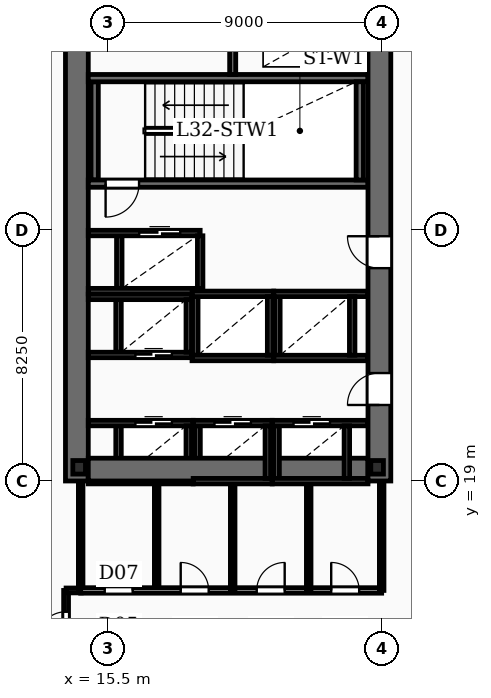
"""IFC4 building model, lengths in metres.
Left out: names, types, materials, properties, quantities, classifications, styles, units other than length and angle.
Written with IfcOpenShell. Run it as: python <this file> out.ifc"""

import sys

from ifc_helpers import new_model, si_unit, direction, frame, frame_2d, origin, origin_2d, place, context, subcontext, project, spatial, rectangle, i_section, extrude, element, fill, save


model = new_model("IFC4")
c1 = context("Model", 3, precision=1e-05, world=origin(), true_north=direction((0.0, 1.0)))
c2 = subcontext(c1, "Body", "Model", "MODEL_VIEW")
j1 = project(units=[si_unit("LENGTHUNIT", "METRE"), si_unit("PLANEANGLEUNIT", "RADIAN")], contexts=[c1])
p1 = place(None, origin())
s1 = spatial("IfcSite", under=j1, at=p1, CompositionType="ELEMENT")
p2 = place(p1, origin())
s2 = spatial("IfcBuilding", under=s1, at=p2, CompositionType="ELEMENT")
p3 = place(p2, frame((0.0, 0.0, 138.25)))
s3 = spatial("IfcBuildingStorey", under=s2, at=p3, CompositionType="ELEMENT", Elevation=138.25)
p4 = place(p3, frame((14.475, 19.0, -0.27), z_axis=(0.0, 0.0, 1.0), x_axis=(0.0, 1.0, 0.0)))
e1 = element("IfcWall", 1, at=p4, inside=s3, PredefinedType="SHEAR", context=c2, shape_type="SweptSolid", body=[
    extrude(rectangle(XDim=15.3, YDim=0.75, at=frame_2d((7.65, 0.0))), origin(), (0.0, 0.0, 1.0), 3.75),
])
p5 = place(p3, frame((24.425, 19.0, -0.27), z_axis=(0.0, 0.0, 1.0), x_axis=(0.0, 1.0, 0.0)))
e2 = element("IfcWall", 2, at=p5, inside=s3, PredefinedType="SHEAR", context=c2, shape_type="SweptSolid", body=[
    extrude(rectangle(XDim=15.3, YDim=0.75, at=frame_2d((7.65, 0.0))), origin(), (0.0, 0.0, 1.0), 3.75),
])
p6 = place(p5, frame((2.5, 0.0, 0.27)))
e3 = element("IfcOpeningElement", 3, at=p6, cuts=e2, PredefinedType="OPENING", context=c2, shape_type="SweptSolid", body=[
    extrude(rectangle(XDim=1.05, YDim=2.15, at=frame_2d((0.525, 1.075))), frame((0.0, 0.385, 0.0), z_axis=(0.0, -1.0, 0.0), x_axis=(1.0, 0.0, 0.0)), (0.0, 0.0, 1.0), 0.77),
])
p7 = place(p5, frame((7.0, 0.0, 0.27)))
e4 = element("IfcOpeningElement", 4, at=p7, cuts=e2, PredefinedType="OPENING", context=c2, shape_type="SweptSolid", body=[
    extrude(rectangle(XDim=1.05, YDim=2.15, at=frame_2d((0.525, 1.075))), frame((0.0, 0.385, 0.0), z_axis=(0.0, -1.0, 0.0), x_axis=(1.0, 0.0, 0.0)), (0.0, 0.0, 1.0), 0.77),
])
p8 = place(p3, frame((14.85, 19.375, -0.27), z_axis=(0.0, 0.0, 1.0), x_axis=(1.0, 0.0, 0.0)))
e5 = element("IfcWall", 5, at=p8, inside=s3, PredefinedType="SHEAR", context=c2, shape_type="SweptSolid", body=[
    extrude(rectangle(XDim=9.2, YDim=0.75, at=frame_2d((4.6, 0.0))), origin(), (0.0, 0.0, 1.0), 3.75),
])
for number, where, z_axis, x_axis in (
    (6, (14.55, 19.45, -0.27), (0.0, 0.0, 1.0), (1.0, 0.0, 0.0)),
    (7, (24.35, 19.45, -0.27), (0.0, 0.0, 1.0), (1.0, 0.0, 0.0)),
):
    element("IfcColumn", number, at=place(p3, frame(where, z_axis=z_axis, x_axis=x_axis)), inside=s3, PredefinedType="COLUMN", context=c2, shape_type="SweptSolid", body=[
        extrude(i_section(OverallWidth=0.416, OverallDepth=0.446, WebThickness=0.039, FlangeThickness=0.063, FilletRadius=0.02, at=origin_2d()), origin(), (0.0, 0.0, 1.0), 3.75),
    ])
p9 = place(p3, frame((24.05, 28.78, 0.0), z_axis=(0.0, 0.0, 1.0), x_axis=(-1.0, 0.0, 0.0)))
e8 = element("IfcWall", 8, at=p9, inside=s3, PredefinedType="SOLIDWALL", context=c2, shape_type="SweptSolid", body=[
    extrude(rectangle(XDim=9.2, YDim=0.24, at=frame_2d((4.6, 0.0))), origin(), (0.0, 0.0, 1.0), 3.48),
])
p10 = place(p9, frame((7.53, 0.0, 0.0)))
e9 = element("IfcOpeningElement", 9, at=p10, cuts=e8, PredefinedType="OPENING", context=c2, shape_type="SweptSolid", body=[
    extrude(rectangle(XDim=1.1, YDim=2.15, at=frame_2d((0.55, 1.075))), frame((0.0, 0.13, 0.0), z_axis=(0.0, -1.0, 0.0), x_axis=(1.0, 0.0, 0.0)), (0.0, 0.0, 1.0), 0.26),
])
p11 = place(p3, frame((14.85, 32.25, 0.0), z_axis=(0.0, 0.0, 1.0), x_axis=(1.0, 0.0, 0.0)))
e10 = element("IfcWall", 10, at=p11, inside=s3, PredefinedType="SOLIDWALL", context=c2, shape_type="SweptSolid", body=[
    extrude(rectangle(XDim=9.2, YDim=0.24, at=frame_2d((4.6, 0.0))), origin(), (0.0, 0.0, 1.0), 3.48),
])
for number, where, z_axis, x_axis in (
    (11, (15.06, 28.9, 0.0), (0.0, 0.0, 1.0), (0.0, 1.0, 0.0)),
    (12, (23.78, 28.9, 0.0), (0.0, 0.0, 1.0), (0.0, 1.0, 0.0)),
):
    element("IfcWall", number, at=place(p3, frame(where, z_axis=z_axis, x_axis=x_axis)), inside=s3, PredefinedType="SOLIDWALL", context=c2, shape_type="SweptSolid", body=[
        extrude(rectangle(XDim=3.23, YDim=0.24, at=frame_2d((1.615, 0.0))), origin(), (0.0, 0.0, 1.0), 3.48),
    ])
p12 = place(p3, frame((19.6, 32.37, 0.0), z_axis=(0.0, 0.0, 1.0), x_axis=(0.0, 1.0, 0.0)))
e13 = element("IfcWall", 13, at=p12, inside=s3, PredefinedType="SOLIDWALL", context=c2, shape_type="SweptSolid", body=[
    extrude(rectangle(XDim=1.13, YDim=0.2, at=frame_2d((0.565, 0.0))), origin(), (0.0, 0.0, 1.0), 3.48),
])
p13 = place(p3, frame((14.85, 20.905, 0.0), z_axis=(0.0, 0.0, 1.0), x_axis=(1.0, 0.0, 0.0)))
e14 = element("IfcWall", 14, at=p13, inside=s3, PredefinedType="SOLIDWALL", context=c2, shape_type="SweptSolid", body=[
    extrude(rectangle(XDim=3.45, YDim=0.18, at=frame_2d((1.725, 0.0))), origin(), (0.0, 0.0, 1.0), 3.48),
])
p14 = place(p13, frame((1.55, 0.0, 0.0)))
e15 = element("IfcOpeningElement", 15, at=p14, cuts=e14, PredefinedType="OPENING", context=c2, shape_type="SweptSolid", body=[
    extrude(rectangle(XDim=1.2, YDim=2.2, at=frame_2d((0.6, 1.1))), frame((0.0, 0.1, 0.0), z_axis=(0.0, -1.0, 0.0), x_axis=(1.0, 0.0, 0.0)), (0.0, 0.0, 1.0), 0.2),
])
p15 = place(p3, frame((14.85, 18.995, 0.0), z_axis=(0.0, 0.0, 1.0), x_axis=(1.0, 0.0, 0.0)))
e16 = element("IfcWall", 16, at=p15, inside=s3, PredefinedType="SOLIDWALL", context=c2, shape_type="SweptSolid", body=[
    extrude(rectangle(XDim=3.45, YDim=0.18, at=frame_2d((1.725, 0.0))), origin(), (0.0, 0.0, 1.0), 3.48),
])
for number, where, z_axis, x_axis in (
    (17, (15.845, 19.085, 0.0), (0.0, 0.0, 1.0), (0.0, 1.0, 0.0)),
    (18, (18.155, 19.085, 0.0), (0.0, 0.0, 1.0), (0.0, 1.0, 0.0)),
):
    element("IfcWall", number, at=place(p3, frame(where, z_axis=z_axis, x_axis=x_axis)), inside=s3, PredefinedType="SOLIDWALL", context=c2, shape_type="SweptSolid", body=[
        extrude(rectangle(XDim=1.73, YDim=0.18, at=frame_2d((0.865, 0.0))), origin(), (0.0, 0.0, 1.0), 3.48),
    ])
p16 = place(p3, frame((18.3, 20.905, 0.0), z_axis=(0.0, 0.0, 1.0), x_axis=(1.0, 0.0, 0.0)))
e19 = element("IfcWall", 19, at=p16, inside=s3, PredefinedType="SOLIDWALL", context=c2, shape_type="SweptSolid", body=[
    extrude(rectangle(XDim=2.6, YDim=0.18, at=frame_2d((1.3, 0.0))), origin(), (0.0, 0.0, 1.0), 3.48),
])
p17 = place(p16, frame((0.7, 0.0, 0.0)))
e20 = element("IfcOpeningElement", 20, at=p17, cuts=e19, PredefinedType="OPENING", context=c2, shape_type="SweptSolid", body=[
    extrude(rectangle(XDim=1.2, YDim=2.2, at=frame_2d((0.6, 1.1))), frame((0.0, 0.1, 0.0), z_axis=(0.0, -1.0, 0.0), x_axis=(1.0, 0.0, 0.0)), (0.0, 0.0, 1.0), 0.2),
])
p18 = place(p3, frame((18.3, 18.995, 0.0), z_axis=(0.0, 0.0, 1.0), x_axis=(1.0, 0.0, 0.0)))
e21 = element("IfcWall", 21, at=p18, inside=s3, PredefinedType="SOLIDWALL", context=c2, shape_type="SweptSolid", body=[
    extrude(rectangle(XDim=2.6, YDim=0.18, at=frame_2d((1.3, 0.0))), origin(), (0.0, 0.0, 1.0), 3.48),
])
for number, where, z_axis, x_axis in (
    (22, (18.445, 19.085, 0.0), (0.0, 0.0, 1.0), (0.0, 1.0, 0.0)),
    (23, (20.755, 19.085, 0.0), (0.0, 0.0, 1.0), (0.0, 1.0, 0.0)),
):
    element("IfcWall", number, at=place(p3, frame(where, z_axis=z_axis, x_axis=x_axis)), inside=s3, PredefinedType="SOLIDWALL", context=c2, shape_type="SweptSolid", body=[
        extrude(rectangle(XDim=1.73, YDim=0.18, at=frame_2d((0.865, 0.0))), origin(), (0.0, 0.0, 1.0), 3.48),
    ])
p19 = place(p3, frame((20.9, 20.905, 0.0), z_axis=(0.0, 0.0, 1.0), x_axis=(1.0, 0.0, 0.0)))
e24 = element("IfcWall", 24, at=p19, inside=s3, PredefinedType="SOLIDWALL", context=c2, shape_type="SweptSolid", body=[
    extrude(rectangle(XDim=3.15, YDim=0.18, at=frame_2d((1.575, 0.0))), origin(), (0.0, 0.0, 1.0), 3.48),
])
p20 = place(p19, frame((0.7, 0.0, 0.0)))
e25 = element("IfcOpeningElement", 25, at=p20, cuts=e24, PredefinedType="OPENING", context=c2, shape_type="SweptSolid", body=[
    extrude(rectangle(XDim=1.2, YDim=2.2, at=frame_2d((0.6, 1.1))), frame((0.0, 0.1, 0.0), z_axis=(0.0, -1.0, 0.0), x_axis=(1.0, 0.0, 0.0)), (0.0, 0.0, 1.0), 0.2),
])
p21 = place(p3, frame((20.9, 18.995, 0.0), z_axis=(0.0, 0.0, 1.0), x_axis=(1.0, 0.0, 0.0)))
e26 = element("IfcWall", 26, at=p21, inside=s3, PredefinedType="SOLIDWALL", context=c2, shape_type="SweptSolid", body=[
    extrude(rectangle(XDim=3.15, YDim=0.18, at=frame_2d((1.575, 0.0))), origin(), (0.0, 0.0, 1.0), 3.48),
])
for number, where, z_axis, x_axis in (
    (27, (21.045, 19.085, 0.0), (0.0, 0.0, 1.0), (0.0, 1.0, 0.0)),
    (28, (23.355, 19.085, 0.0), (0.0, 0.0, 1.0), (0.0, 1.0, 0.0)),
):
    element("IfcWall", number, at=place(p3, frame(where, z_axis=z_axis, x_axis=x_axis)), inside=s3, PredefinedType="SOLIDWALL", context=c2, shape_type="SweptSolid", body=[
        extrude(rectangle(XDim=1.73, YDim=0.18, at=frame_2d((0.865, 0.0))), origin(), (0.0, 0.0, 1.0), 3.48),
    ])
p22 = place(p3, frame((14.85, 25.055, 0.0), z_axis=(0.0, 0.0, 1.0), x_axis=(1.0, 0.0, 0.0)))
e29 = element("IfcWall", 29, at=p22, inside=s3, PredefinedType="SOLIDWALL", context=c2, shape_type="SweptSolid", body=[
    extrude(rectangle(XDim=3.412, YDim=0.18, at=frame_2d((1.706, 0.0))), origin(), (0.0, 0.0, 1.0), 3.48),
])
p23 = place(p3, frame((14.85, 23.145, 0.0), z_axis=(0.0, 0.0, 1.0), x_axis=(1.0, 0.0, 0.0)))
e30 = element("IfcWall", 30, at=p23, inside=s3, PredefinedType="SOLIDWALL", context=c2, shape_type="SweptSolid", body=[
    extrude(rectangle(XDim=3.412, YDim=0.18, at=frame_2d((1.706, 0.0))), origin(), (0.0, 0.0, 1.0), 3.48),
])
p24 = place(p23, frame((1.55, 0.0, 0.0)))
e31 = element("IfcOpeningElement", 31, at=p24, cuts=e30, PredefinedType="OPENING", context=c2, shape_type="SweptSolid", body=[
    extrude(rectangle(XDim=1.2, YDim=2.2, at=frame_2d((0.6, 1.1))), frame((0.0, 0.1, 0.0), z_axis=(0.0, -1.0, 0.0), x_axis=(1.0, 0.0, 0.0)), (0.0, 0.0, 1.0), 0.2),
])
for number, where, z_axis, x_axis in (
    (32, (15.845, 23.235, 0.0), (0.0, 0.0, 1.0), (0.0, 1.0, 0.0)),
    (33, (18.155, 23.235, 0.0), (0.0, 0.0, 1.0), (0.0, 1.0, 0.0)),
):
    element("IfcWall", number, at=place(p3, frame(where, z_axis=z_axis, x_axis=x_axis)), inside=s3, PredefinedType="SOLIDWALL", context=c2, shape_type="SweptSolid", body=[
        extrude(rectangle(XDim=1.73, YDim=0.18, at=frame_2d((0.865, 0.0))), origin(), (0.0, 0.0, 1.0), 3.48),
    ])
for number, where, z_axis, x_axis in (
    (34, (18.262, 25.155, 0.0), (0.0, 0.0, 1.0), (1.0, 0.0, 0.0)),
    (35, (18.262, 23.045, 0.0), (0.0, 0.0, 1.0), (1.0, 0.0, 0.0)),
):
    element("IfcWall", number, at=place(p3, frame(where, z_axis=z_axis, x_axis=x_axis)), inside=s3, PredefinedType="SOLIDWALL", context=c2, shape_type="SweptSolid", body=[
        extrude(rectangle(XDim=2.688, YDim=0.18, at=frame_2d((1.344, 0.0))), origin(), (0.0, 0.0, 1.0), 3.48),
    ])
for number, where, z_axis, x_axis in (
    (36, (18.37, 23.135, 0.0), (0.0, 0.0, 1.0), (0.0, 1.0, 0.0)),
    (37, (20.83, 23.135, 0.0), (0.0, 0.0, 1.0), (0.0, 1.0, 0.0)),
):
    element("IfcWall", number, at=place(p3, frame(where, z_axis=z_axis, x_axis=x_axis)), inside=s3, PredefinedType="SOLIDWALL", context=c2, shape_type="SweptSolid", body=[
        extrude(rectangle(XDim=1.93, YDim=0.18, at=frame_2d((0.965, 0.0))), origin(), (0.0, 0.0, 1.0), 3.48),
    ])
for number, where, z_axis, x_axis in (
    (38, (20.95, 25.155, 0.0), (0.0, 0.0, 1.0), (1.0, 0.0, 0.0)),
    (39, (20.95, 23.045, 0.0), (0.0, 0.0, 1.0), (1.0, 0.0, 0.0)),
):
    element("IfcWall", number, at=place(p3, frame(where, z_axis=z_axis, x_axis=x_axis)), inside=s3, PredefinedType="SOLIDWALL", context=c2, shape_type="SweptSolid", body=[
        extrude(rectangle(XDim=3.1, YDim=0.18, at=frame_2d((1.55, 0.0))), origin(), (0.0, 0.0, 1.0), 3.48),
    ])
for number, where, z_axis, x_axis in (
    (40, (21.07, 23.135, 0.0), (0.0, 0.0, 1.0), (0.0, 1.0, 0.0)),
    (41, (23.53, 23.135, 0.0), (0.0, 0.0, 1.0), (0.0, 1.0, 0.0)),
):
    element("IfcWall", number, at=place(p3, frame(where, z_axis=z_axis, x_axis=x_axis)), inside=s3, PredefinedType="SOLIDWALL", context=c2, shape_type="SweptSolid", body=[
        extrude(rectangle(XDim=1.93, YDim=0.18, at=frame_2d((0.965, 0.0))), origin(), (0.0, 0.0, 1.0), 3.48),
    ])
p25 = place(p3, frame((14.85, 27.155, 0.0), z_axis=(0.0, 0.0, 1.0), x_axis=(1.0, 0.0, 0.0)))
e42 = element("IfcWall", 42, at=p25, inside=s3, PredefinedType="SOLIDWALL", context=c2, shape_type="SweptSolid", body=[
    extrude(rectangle(XDim=3.68, YDim=0.18, at=frame_2d((1.84, 0.0))), origin(), (0.0, 0.0, 1.0), 3.48),
])
p26 = place(p25, frame((1.675, 0.0, 0.0)))
e43 = element("IfcOpeningElement", 43, at=p26, cuts=e42, PredefinedType="OPENING", context=c2, shape_type="SweptSolid", body=[
    extrude(rectangle(XDim=1.35, YDim=2.3, at=frame_2d((0.675, 1.15))), frame((0.0, 0.1, 0.0), z_axis=(0.0, -1.0, 0.0), x_axis=(1.0, 0.0, 0.0)), (0.0, 0.0, 1.0), 0.2),
])
p27 = place(p3, frame((14.85, 25.245, 0.0), z_axis=(0.0, 0.0, 1.0), x_axis=(1.0, 0.0, 0.0)))
e44 = element("IfcWall", 44, at=p27, inside=s3, PredefinedType="SOLIDWALL", context=c2, shape_type="SweptSolid", body=[
    extrude(rectangle(XDim=3.68, YDim=0.18, at=frame_2d((1.84, 0.0))), origin(), (0.0, 0.0, 1.0), 3.48),
])
for number, where, z_axis, x_axis in (
    (45, (15.87, 25.335, 0.0), (0.0, 0.0, 1.0), (0.0, 1.0, 0.0)),
    (46, (18.53, 25.335, 0.0), (0.0, 0.0, 1.0), (0.0, 1.0, 0.0)),
):
    element("IfcWall", number, at=place(p3, frame(where, z_axis=z_axis, x_axis=x_axis)), inside=s3, PredefinedType="SOLIDWALL", context=c2, shape_type="SweptSolid", body=[
        extrude(rectangle(XDim=1.73, YDim=0.18, at=frame_2d((0.865, 0.0))), origin(), (0.0, 0.0, 1.0), 3.48),
    ])
for number, where, z_axis, x_axis in (
    (47, (17.1, 15.4, 0.0), (0.0, 0.0, 1.0), (0.0, 1.0, 0.0)),
    (48, (19.6, 15.4, 0.0), (0.0, 0.0, 1.0), (0.0, 1.0, 0.0)),
    (49, (22.1, 15.4, 0.0), (0.0, 0.0, 1.0), (0.0, 1.0, 0.0)),
):
    element("IfcWall", number, at=place(p3, frame(where, z_axis=z_axis, x_axis=x_axis)), inside=s3, PredefinedType="PARTITIONING", context=c2, shape_type="SweptSolid", body=[
        extrude(rectangle(XDim=3.58, YDim=0.15, at=frame_2d((1.79, 0.0))), origin(), (0.0, 0.0, 1.0), 2.54),
    ])
p28 = place(p3, frame((14.6, 15.4, 0.0), z_axis=(0.0, 0.0, 1.0), x_axis=(1.0, 0.0, 0.0)))
e50 = element("IfcWall", 50, at=p28, inside=s3, PredefinedType="PARTITIONING", context=c2, shape_type="SweptSolid", body=[
    extrude(rectangle(XDim=9.9, YDim=0.18, at=frame_2d((4.95, 0.0))), origin(), (0.0, 0.0, 1.0), 2.54),
])
p29 = place(p28, frame((0.79, 0.0, 0.0)))
e51 = element("IfcOpeningElement", 51, at=p29, cuts=e50, PredefinedType="OPENING", context=c2, shape_type="SweptSolid", body=[
    extrude(rectangle(XDim=0.92, YDim=2.1, at=frame_2d((0.46, 1.05))), frame((0.0, 0.1, 0.0), z_axis=(0.0, -1.0, 0.0), x_axis=(1.0, 0.0, 0.0)), (0.0, 0.0, 1.0), 0.2),
])
p30 = place(p28, frame((3.29, 0.0, 0.0)))
e52 = element("IfcOpeningElement", 52, at=p30, cuts=e50, PredefinedType="OPENING", context=c2, shape_type="SweptSolid", body=[
    extrude(rectangle(XDim=0.92, YDim=2.1, at=frame_2d((0.46, 1.05))), frame((0.0, 0.1, 0.0), z_axis=(0.0, -1.0, 0.0), x_axis=(1.0, 0.0, 0.0)), (0.0, 0.0, 1.0), 0.2),
])
p31 = place(p28, frame((5.79, 0.0, 0.0)))
e53 = element("IfcOpeningElement", 53, at=p31, cuts=e50, PredefinedType="OPENING", context=c2, shape_type="SweptSolid", body=[
    extrude(rectangle(XDim=0.92, YDim=2.1, at=frame_2d((0.46, 1.05))), frame((0.0, 0.1, 0.0), z_axis=(0.0, -1.0, 0.0), x_axis=(1.0, 0.0, 0.0)), (0.0, 0.0, 1.0), 0.2),
])
p32 = place(p28, frame((8.24, 0.0, 0.0)))
e54 = element("IfcOpeningElement", 54, at=p32, cuts=e50, PredefinedType="OPENING", context=c2, shape_type="SweptSolid", body=[
    extrude(rectangle(XDim=0.92, YDim=2.1, at=frame_2d((0.46, 1.05))), frame((0.0, 0.1, 0.0), z_axis=(0.0, -1.0, 0.0), x_axis=(1.0, 0.0, 0.0)), (0.0, 0.0, 1.0), 0.2),
])
for number, where, z_axis, x_axis in (
    (55, (14.6, 15.4, 0.0), (0.0, 0.0, 1.0), (0.0, 1.0, 0.0)),
    (56, (24.5, 15.4, 0.0), (0.0, 0.0, 1.0), (0.0, 1.0, 0.0)),
):
    element("IfcWall", number, at=place(p3, frame(where, z_axis=z_axis, x_axis=x_axis)), inside=s3, PredefinedType="PARTITIONING", context=c2, shape_type="SweptSolid", body=[
        extrude(rectangle(XDim=3.58, YDim=0.15, at=frame_2d((1.79, 0.0))), origin(), (0.0, 0.0, 1.0), 2.54),
    ])
p33 = place(p3, frame((14.12, 13.1, 0.0), z_axis=(0.0, 0.0, 1.0), x_axis=(0.0, 1.0, 0.0)))
e57 = element("IfcWall", 57, at=p33, inside=s3, PredefinedType="PARTITIONING", context=c2, shape_type="SweptSolid", body=[
    extrude(rectangle(XDim=2.3, YDim=0.16, at=frame_2d((1.15, 0.0))), origin(), (0.0, 0.0, 1.0), 2.54),
])
p34 = place(p33, frame((0.65, 0.0, 0.0)))
e58 = element("IfcOpeningElement", 58, at=p34, cuts=e57, PredefinedType="OPENING", context=c2, shape_type="SweptSolid", body=[
    extrude(rectangle(XDim=0.95, YDim=2.15, at=frame_2d((0.475, 1.075))), frame((0.0, 0.09, 0.0), z_axis=(0.0, -1.0, 0.0), x_axis=(1.0, 0.0, 0.0)), (0.0, 0.0, 1.0), 0.18),
])
p35 = place(p3, frame((14.12, 15.4, 0.0), z_axis=(0.0, 0.0, 1.0), x_axis=(1.0, 0.0, 0.0)))
e59 = element("IfcWall", 59, at=p35, inside=s3, PredefinedType="PARTITIONING", context=c2, shape_type="SweptSolid", body=[
    extrude(rectangle(XDim=0.5, YDim=0.16, at=frame_2d((0.25, 0.0))), origin(), (0.0, 0.0, 1.0), 2.54),
])
p36 = place(p6, origin())
e60 = element("IfcDoor", 60, at=p36, inside=s3, OperationType="SINGLE_SWING_LEFT", PredefinedType="DOOR", context=c2, shape_type="SweptSolid", body=[
    extrude(rectangle(XDim=1.05, YDim=2.15, at=frame_2d((0.525, 1.075))), frame((0.0, 0.025, 0.0), z_axis=(0.0, -1.0, 0.0), x_axis=(1.0, 0.0, 0.0)), (0.0, 0.0, 1.0), 0.05),
])
fill(e3, e60)
p37 = place(p7, origin())
e61 = element("IfcDoor", 61, at=p37, inside=s3, OperationType="SINGLE_SWING_RIGHT", PredefinedType="DOOR", context=c2, shape_type="SweptSolid", body=[
    extrude(rectangle(XDim=1.05, YDim=2.15, at=frame_2d((0.525, 1.075))), frame((0.0, 0.025, 0.0), z_axis=(0.0, -1.0, 0.0), x_axis=(1.0, 0.0, 0.0)), (0.0, 0.0, 1.0), 0.05),
])
fill(e4, e61)
p38 = place(p10, origin())
e62 = element("IfcDoor", 62, at=p38, inside=s3, OperationType="SINGLE_SWING_RIGHT", PredefinedType="DOOR", context=c2, shape_type="SweptSolid", body=[
    extrude(rectangle(XDim=1.1, YDim=2.15, at=frame_2d((0.55, 1.075))), frame((0.0, 0.025, 0.0), z_axis=(0.0, -1.0, 0.0), x_axis=(1.0, 0.0, 0.0)), (0.0, 0.0, 1.0), 0.05),
])
fill(e9, e62)
p39 = place(p14, origin())
e63 = element("IfcDoor", 63, at=p39, inside=s3, OperationType="DOUBLE_DOOR_SLIDING", PredefinedType="DOOR", context=c2, shape_type="SweptSolid", body=[
    extrude(rectangle(XDim=1.2, YDim=2.2, at=frame_2d((0.6, 1.1))), frame((0.0, 0.025, 0.0), z_axis=(0.0, -1.0, 0.0), x_axis=(1.0, 0.0, 0.0)), (0.0, 0.0, 1.0), 0.05),
])
fill(e15, e63)
p40 = place(p17, origin())
e64 = element("IfcDoor", 64, at=p40, inside=s3, OperationType="DOUBLE_DOOR_SLIDING", PredefinedType="DOOR", context=c2, shape_type="SweptSolid", body=[
    extrude(rectangle(XDim=1.2, YDim=2.2, at=frame_2d((0.6, 1.1))), frame((0.0, 0.025, 0.0), z_axis=(0.0, -1.0, 0.0), x_axis=(1.0, 0.0, 0.0)), (0.0, 0.0, 1.0), 0.05),
])
fill(e20, e64)
p41 = place(p20, origin())
e65 = element("IfcDoor", 65, at=p41, inside=s3, OperationType="DOUBLE_DOOR_SLIDING", PredefinedType="DOOR", context=c2, shape_type="SweptSolid", body=[
    extrude(rectangle(XDim=1.2, YDim=2.2, at=frame_2d((0.6, 1.1))), frame((0.0, 0.025, 0.0), z_axis=(0.0, -1.0, 0.0), x_axis=(1.0, 0.0, 0.0)), (0.0, 0.0, 1.0), 0.05),
])
fill(e25, e65)
p42 = place(p24, origin())
e66 = element("IfcDoor", 66, at=p42, inside=s3, OperationType="DOUBLE_DOOR_SLIDING", PredefinedType="DOOR", context=c2, shape_type="SweptSolid", body=[
    extrude(rectangle(XDim=1.2, YDim=2.2, at=frame_2d((0.6, 1.1))), frame((0.0, 0.025, 0.0), z_axis=(0.0, -1.0, 0.0), x_axis=(1.0, 0.0, 0.0)), (0.0, 0.0, 1.0), 0.05),
])
fill(e31, e66)
p43 = place(p26, origin())
e67 = element("IfcDoor", 67, at=p43, inside=s3, OperationType="DOUBLE_DOOR_SLIDING", PredefinedType="DOOR", context=c2, shape_type="SweptSolid", body=[
    extrude(rectangle(XDim=1.35, YDim=2.3, at=frame_2d((0.675, 1.15))), frame((0.0, 0.025, 0.0), z_axis=(0.0, -1.0, 0.0), x_axis=(1.0, 0.0, 0.0)), (0.0, 0.0, 1.0), 0.05),
])
fill(e43, e67)
p44 = place(p29, origin())
e68 = element("IfcDoor", 68, at=p44, inside=s3, OperationType="SINGLE_SWING_RIGHT", PredefinedType="DOOR", context=c2, shape_type="SweptSolid", body=[
    extrude(rectangle(XDim=0.92, YDim=2.1, at=frame_2d((0.46, 1.05))), frame((0.0, 0.025, 0.0), z_axis=(0.0, -1.0, 0.0), x_axis=(1.0, 0.0, 0.0)), (0.0, 0.0, 1.0), 0.05),
])
fill(e51, e68)
p45 = place(p30, origin())
e69 = element("IfcDoor", 69, at=p45, inside=s3, OperationType="SINGLE_SWING_LEFT", PredefinedType="DOOR", context=c2, shape_type="SweptSolid", body=[
    extrude(rectangle(XDim=0.92, YDim=2.1, at=frame_2d((0.46, 1.05))), frame((0.0, 0.025, 0.0), z_axis=(0.0, -1.0, 0.0), x_axis=(1.0, 0.0, 0.0)), (0.0, 0.0, 1.0), 0.05),
])
fill(e52, e69)
p46 = place(p31, origin())
e70 = element("IfcDoor", 70, at=p46, inside=s3, OperationType="SINGLE_SWING_RIGHT", PredefinedType="DOOR", context=c2, shape_type="SweptSolid", body=[
    extrude(rectangle(XDim=0.92, YDim=2.1, at=frame_2d((0.46, 1.05))), frame((0.0, 0.025, 0.0), z_axis=(0.0, -1.0, 0.0), x_axis=(1.0, 0.0, 0.0)), (0.0, 0.0, 1.0), 0.05),
])
fill(e53, e70)
p47 = place(p32, origin())
e71 = element("IfcDoor", 71, at=p47, inside=s3, OperationType="SINGLE_SWING_LEFT", PredefinedType="DOOR", context=c2, shape_type="SweptSolid", body=[
    extrude(rectangle(XDim=0.92, YDim=2.1, at=frame_2d((0.46, 1.05))), frame((0.0, 0.025, 0.0), z_axis=(0.0, -1.0, 0.0), x_axis=(1.0, 0.0, 0.0)), (0.0, 0.0, 1.0), 0.05),
])
fill(e54, e71)
p48 = place(p34, origin())
e72 = element("IfcDoor", 72, at=p48, inside=s3, OperationType="SINGLE_SWING_LEFT", PredefinedType="DOOR", context=c2, shape_type="SweptSolid", body=[
    extrude(rectangle(XDim=0.95, YDim=2.15, at=frame_2d((0.475, 1.075))), frame((0.0, 0.025, 0.0), z_axis=(0.0, -1.0, 0.0), x_axis=(1.0, 0.0, 0.0)), (0.0, 0.0, 1.0), 0.05),
])
fill(e58, e72)
save(model, sys.argv[1])
